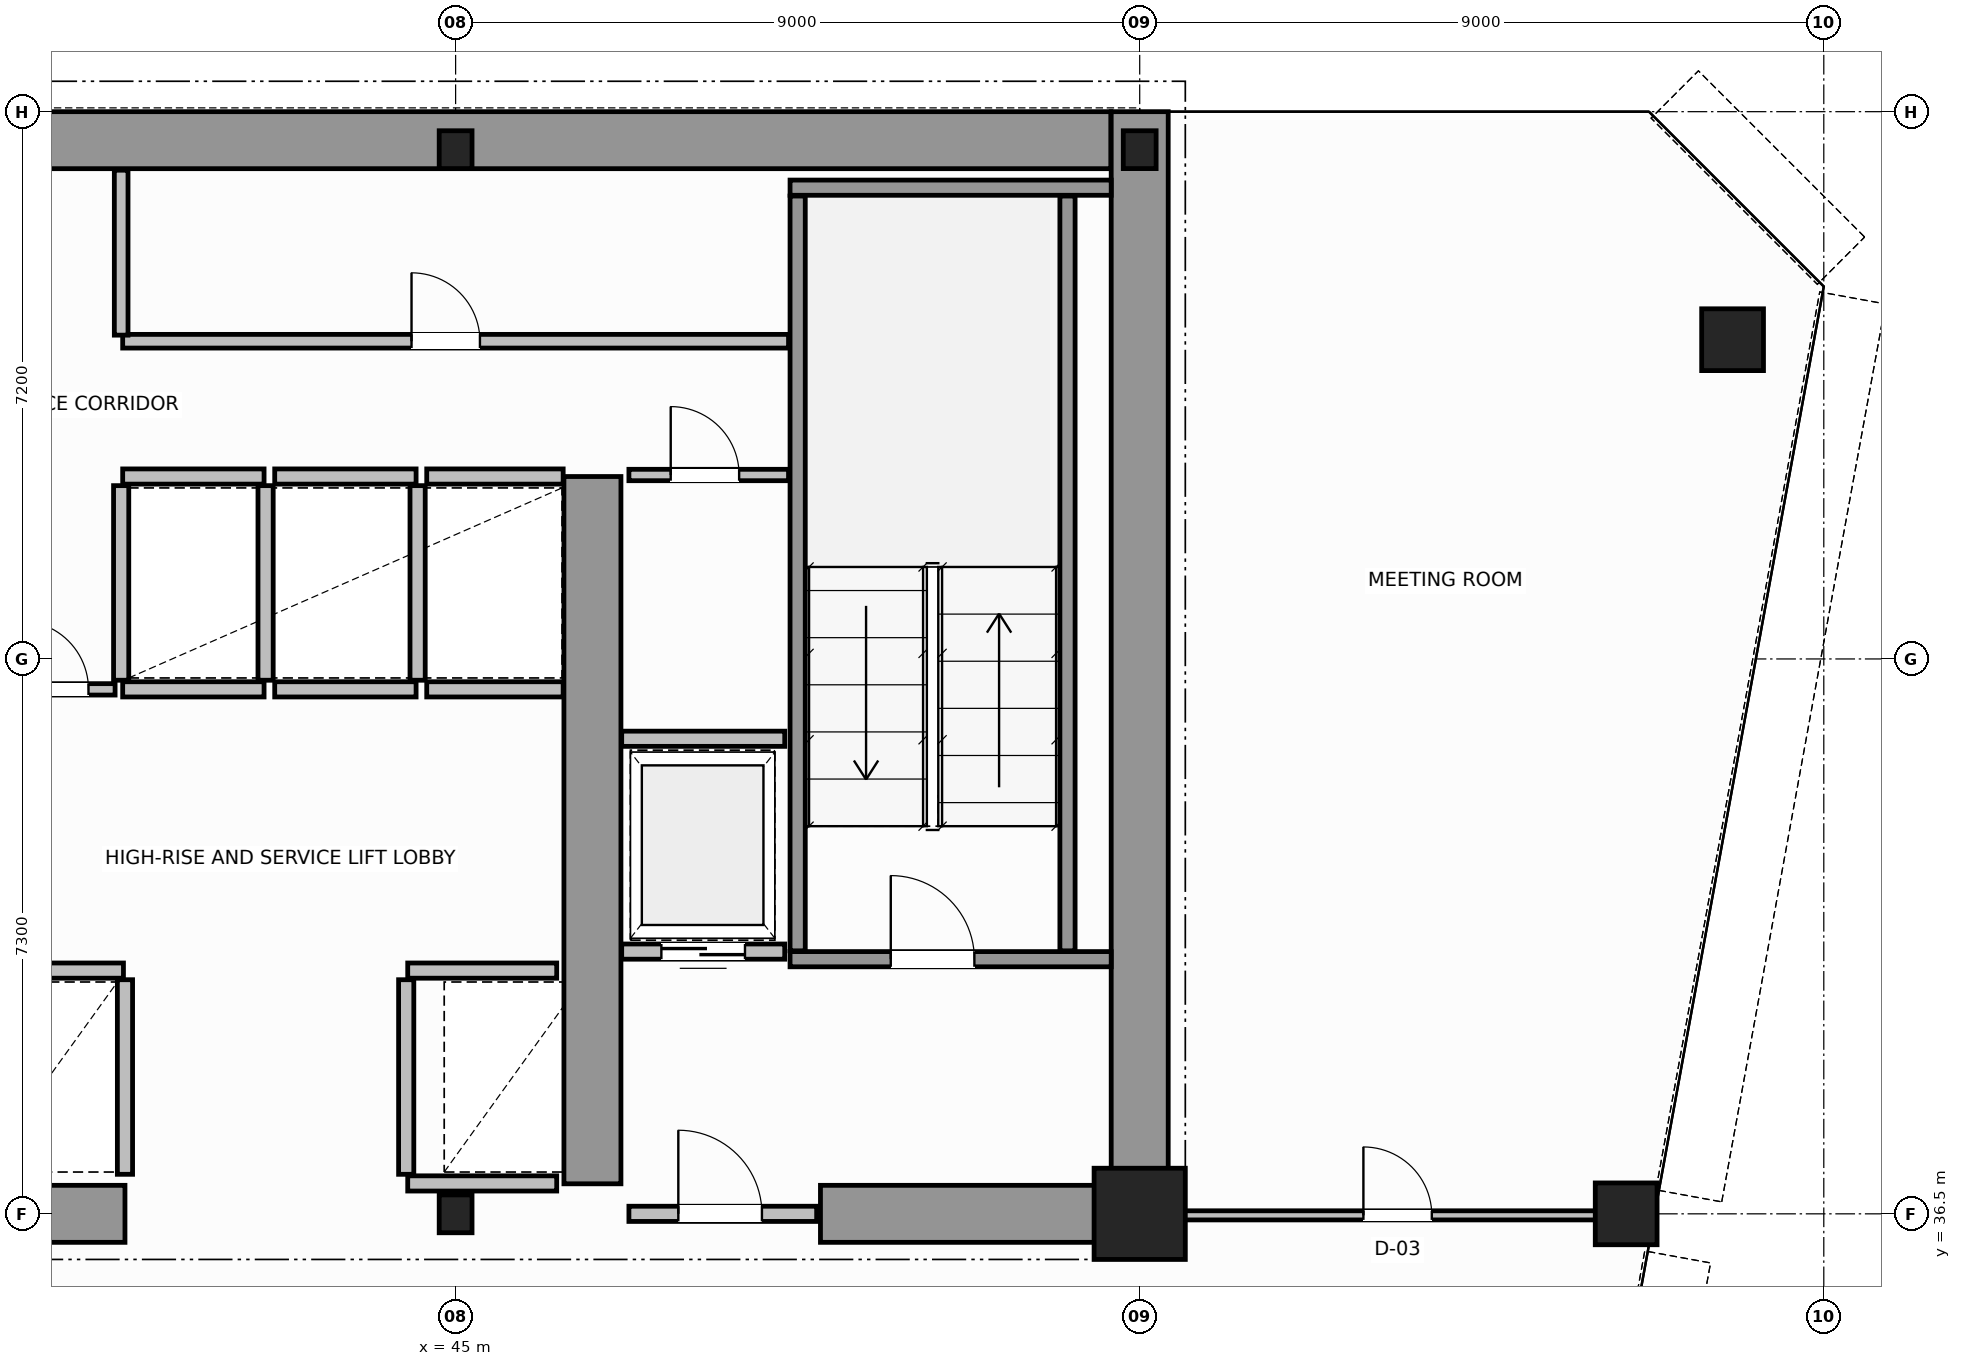
"""IFC4 building model, lengths in metres.
Left out: names, types, materials, properties, quantities, classifications, styles, units other than length and angle.
Written with IfcOpenShell. Run it as: python <this file> out.ifc"""

import sys

from ifc_helpers import new_model, si_unit, direction, frame, frame_2d, origin, origin_2d, place, context, subcontext, project, spatial, rectangle, hollow_circle, i_section, extrude, source, transform, mapped, element, fill, save


model = new_model("IFC4")
c1 = context("Model", 3, precision=1e-05, world=origin(), true_north=direction((0.0, 1.0)))
c2 = subcontext(c1, "Body", "Model", "MODEL_VIEW")
j1 = project(units=[si_unit("LENGTHUNIT", "METRE"), si_unit("PLANEANGLEUNIT", "RADIAN")], contexts=[c1])
p1 = place(None, origin())
s1 = spatial("IfcSite", under=j1, at=p1, CompositionType="ELEMENT")
p2 = place(p1, origin())
s2 = spatial("IfcBuilding", under=s1, at=p2, CompositionType="ELEMENT")
p3 = place(p2, frame((0.0, 0.0, 165.2)))
s3 = spatial("IfcBuildingStorey", under=s2, at=p3, CompositionType="ELEMENT", Elevation=165.2)
m1 = source(origin(), c2, "Body", "SweptSolid", [
    extrude(i_section(OverallWidth=0.432, OverallDepth=0.498, WebThickness=0.055, FlangeThickness=0.068, FilletRadius=0.015, at=origin_2d()), origin(), (0.0, 0.0, 1.0), 3.8),
])
p4 = place(p3, frame((45.0, 36.5, 0.0), z_axis=(0.0, 0.0, 1.0), x_axis=(1.0, 0.0, 0.0)))
e1 = element("IfcColumn", 1, at=p4, inside=s3, PredefinedType="COLUMN", context=c2, shape_type="MappedRepresentation", body=[
    mapped(m1, transform((0.0, 0.0, 0.0), scale=1.0)),
])
m2 = source(origin(), c2, "Body", "SweptSolid", [
    extrude(rectangle(XDim=1.2, YDim=1.2, at=origin_2d()), origin(), (0.0, 0.0, 1.0), 3.8),
])
p5 = place(p3, frame((54.0, 36.5, 0.0), z_axis=(0.0, 0.0, 1.0), x_axis=(1.0, 0.0, 0.0)))
e2 = element("IfcColumn", 2, at=p5, inside=s3, PredefinedType="COLUMN", context=c2, shape_type="MappedRepresentation", body=[
    mapped(m2, transform((0.0, 0.0, 0.0), scale=1.0)),
])
for number, where, z_axis, x_axis in (
    (3, (45.0, 50.5, 0.0), (0.0, 0.0, 1.0), (1.0, 0.0, 0.0)),
    (4, (54.0, 50.5, 0.0), (0.0, 0.0, 1.0), (1.0, 0.0, 0.0)),
):
    element("IfcColumn", number, at=place(p3, frame(where, z_axis=z_axis, x_axis=x_axis)), inside=s3, PredefinedType="COLUMN", context=c2, shape_type="MappedRepresentation", body=[
        mapped(m1, transform((0.0, 0.0, 0.0), scale=1.0)),
    ])
m3 = source(origin(), c2, "Body", "SweptSolid", [
    extrude(hollow_circle(Radius=0.406, WallThickness=0.04, at=origin_2d()), origin(), (0.0, 0.0, 1.0), 3.8),
])
for number, where, z_axis, x_axis in (
    (5, (61.8, 48.0, 0.0), (0.0, 0.0, 1.0), (1.0, 0.0, 0.0)),
    (6, (60.4, 36.5, 0.0), (0.0, 0.0, 1.0), (1.0, 0.0, 0.0)),
):
    element("IfcColumn", number, at=place(p3, frame(where, z_axis=z_axis, x_axis=x_axis)), inside=s3, PredefinedType="COLUMN", context=c2, shape_type="MappedRepresentation", body=[
        mapped(m3, transform((0.0, 0.0, 0.0), scale=1.0)),
    ])
p6 = place(p3, frame((34.002, 50.625, 0.0), z_axis=(0.0, 0.0, 1.0), x_axis=(1.0, 0.0, 0.0)))
e7 = element("IfcWall", 7, at=p6, inside=s3, PredefinedType="SHEAR", context=c2, shape_type="SweptSolid", body=[
    extrude(rectangle(XDim=19.619, YDim=0.75, at=frame_2d((9.81, 0.0))), origin(), (0.0, 0.0, 1.0), 3.8),
])
p7 = place(p3, frame((54.0, 36.5, 0.0), z_axis=(0.0, 0.0, 1.0), x_axis=(0.0, 1.0, 0.0)))
e8 = element("IfcWall", 8, at=p7, inside=s3, PredefinedType="SHEAR", context=c2, shape_type="SweptSolid", body=[
    extrude(rectangle(XDim=14.5, YDim=0.75, at=frame_2d((7.25, 0.0))), origin(), (0.0, 0.0, 1.0), 3.8),
])
p8 = place(p3, frame((36.15, 36.5, 0.0), z_axis=(0.0, 0.0, 1.0), x_axis=(1.0, 0.0, 0.0)))
e9 = element("IfcWall", 9, at=p8, inside=s3, PredefinedType="SHEAR", context=c2, shape_type="SweptSolid", body=[
    extrude(rectangle(XDim=4.5, YDim=0.75, at=frame_2d((2.25, 0.0))), origin(), (0.0, 0.0, 1.0), 3.8),
])
p9 = place(p3, frame((49.8, 36.5, 0.0), z_axis=(0.0, 0.0, 1.0), x_axis=(1.0, 0.0, 0.0)))
e10 = element("IfcWall", 10, at=p9, inside=s3, PredefinedType="SHEAR", context=c2, shape_type="SweptSolid", body=[
    extrude(rectangle(XDim=3.805, YDim=0.75, at=frame_2d((1.902, 0.0))), origin(), (0.0, 0.0, 1.0), 2.38),
])
p10 = place(p3, frame((46.8, 36.895, 0.0), z_axis=(0.0, 0.0, 1.0), x_axis=(0.0, 1.0, 0.0)))
e11 = element("IfcWall", 11, at=p10, inside=s3, PredefinedType="SHEAR", context=c2, shape_type="SweptSolid", body=[
    extrude(rectangle(XDim=9.305, YDim=0.75, at=frame_2d((4.652, 0.0))), origin(), (0.0, 0.0, 1.0), 3.8),
])
p11 = place(p3, frame((49.4, 39.85, 0.0), z_axis=(0.0, 0.0, 1.0), x_axis=(1.0, 0.0, 0.0)))
e12 = element("IfcWall", 12, at=p11, inside=s3, PredefinedType="SOLIDWALL", context=c2, shape_type="SweptSolid", body=[
    extrude(rectangle(XDim=4.225, YDim=0.2, at=frame_2d((2.113, 0.0))), origin(), (0.0, 0.0, 1.0), 3.8),
])
p12 = place(p11, frame((1.325, 0.0, 0.0)))
e13 = element("IfcOpeningElement", 13, at=p12, cuts=e12, PredefinedType="OPENING", context=c2, shape_type="SweptSolid", body=[
    extrude(rectangle(XDim=1.1, YDim=2.15, at=frame_2d((0.55, 1.075))), frame((0.0, 0.11, 0.0), z_axis=(0.0, -1.0, 0.0), x_axis=(1.0, 0.0, 0.0)), (0.0, 0.0, 1.0), 0.22),
])
p13 = place(p3, frame((49.4, 50.0, 0.0), z_axis=(0.0, 0.0, 1.0), x_axis=(1.0, 0.0, 0.0)))
e14 = element("IfcWall", 14, at=p13, inside=s3, PredefinedType="SOLIDWALL", context=c2, shape_type="SweptSolid", body=[
    extrude(rectangle(XDim=4.225, YDim=0.2, at=frame_2d((2.113, 0.0))), origin(), (0.0, 0.0, 1.0), 3.8),
])
for number, where, z_axis, x_axis in (
    (15, (49.5, 39.96, 0.0), (0.0, 0.0, 1.0), (0.0, 1.0, 0.0)),
    (16, (53.05, 39.96, 0.0), (0.0, 0.0, 1.0), (0.0, 1.0, 0.0)),
):
    element("IfcWall", number, at=place(p3, frame(where, z_axis=z_axis, x_axis=x_axis)), inside=s3, PredefinedType="SOLIDWALL", context=c2, shape_type="SweptSolid", body=[
        extrude(rectangle(XDim=9.93, YDim=0.2, at=frame_2d((4.965, 0.0))), origin(), (0.0, 0.0, 1.0), 3.8),
    ])
p14 = place(p3, frame((47.28, 36.5, 0.0), z_axis=(0.0, 0.0, 1.0), x_axis=(1.0, 0.0, 0.0)))
e17 = element("IfcWall", 17, at=p14, inside=s3, PredefinedType="SOLIDWALL", context=c2, shape_type="SweptSolid", body=[
    extrude(rectangle(XDim=2.47, YDim=0.2, at=frame_2d((1.235, 0.0))), origin(), (0.0, 0.0, 1.0), 2.37),
])
p15 = place(p14, frame((0.65, 0.0, 0.0)))
e18 = element("IfcOpeningElement", 18, at=p15, cuts=e17, PredefinedType="OPENING", context=c2, shape_type="SweptSolid", body=[
    extrude(rectangle(XDim=1.1, YDim=2.15, at=frame_2d((0.55, 1.075))), frame((0.0, 0.11, 0.0), z_axis=(0.0, -1.0, 0.0), x_axis=(1.0, 0.0, 0.0)), (0.0, 0.0, 1.0), 0.22),
])
p16 = place(p3, frame((38.785, 39.7, 0.0), z_axis=(0.0, 0.0, 1.0), x_axis=(1.0, 0.0, 0.0)))
e19 = element("IfcWall", 19, at=p16, inside=s3, PredefinedType="SOLIDWALL", context=c2, shape_type="SweptSolid", body=[
    extrude(rectangle(XDim=1.845, YDim=0.2, at=frame_2d((0.922, 0.0))), origin(), (0.0, 0.0, 1.0), 3.58),
])
p17 = place(p3, frame((40.65, 37.02, 0.0), z_axis=(0.0, 0.0, 1.0), x_axis=(0.0, 1.0, 0.0)))
e20 = element("IfcWall", 20, at=p17, inside=s3, PredefinedType="SOLIDWALL", context=c2, shape_type="SweptSolid", body=[
    extrude(rectangle(XDim=2.56, YDim=0.2, at=frame_2d((1.28, 0.0))), origin(), (0.0, 0.0, 1.0), 3.58),
])
p18 = place(p3, frame((44.37, 39.7, 0.0), z_axis=(0.0, 0.0, 1.0), x_axis=(1.0, 0.0, 0.0)))
e21 = element("IfcWall", 21, at=p18, inside=s3, PredefinedType="SOLIDWALL", context=c2, shape_type="SweptSolid", body=[
    extrude(rectangle(XDim=1.96, YDim=0.2, at=frame_2d((0.98, 0.0))), origin(), (0.0, 0.0, 1.0), 3.58),
])
p19 = place(p3, frame((44.37, 36.9, 0.0), z_axis=(0.0, 0.0, 1.0), x_axis=(1.0, 0.0, 0.0)))
e22 = element("IfcWall", 22, at=p19, inside=s3, PredefinedType="SOLIDWALL", context=c2, shape_type="SweptSolid", body=[
    extrude(rectangle(XDim=1.96, YDim=0.2, at=frame_2d((0.98, 0.0))), origin(), (0.0, 0.0, 1.0), 2.37),
])
p20 = place(p3, frame((44.35, 37.02, 0.0), z_axis=(0.0, 0.0, 1.0), x_axis=(0.0, 1.0, 0.0)))
e23 = element("IfcWall", 23, at=p20, inside=s3, PredefinedType="SOLIDWALL", context=c2, shape_type="SweptSolid", body=[
    extrude(rectangle(XDim=2.56, YDim=0.2, at=frame_2d((1.28, 0.0))), origin(), (0.0, 0.0, 1.0), 3.58),
])
for number, where, z_axis, x_axis in (
    (24, (40.62, 43.4, 0.0), (0.0, 0.0, 1.0), (1.0, 0.0, 0.0)),
    (25, (40.62, 46.2, 0.0), (0.0, 0.0, 1.0), (1.0, 0.0, 0.0)),
):
    element("IfcWall", number, at=place(p3, frame(where, z_axis=z_axis, x_axis=x_axis)), inside=s3, PredefinedType="SOLIDWALL", context=c2, shape_type="SweptSolid", body=[
        extrude(rectangle(XDim=1.86, YDim=0.2, at=frame_2d((0.93, 0.0))), origin(), (0.0, 0.0, 1.0), 3.58),
    ])
for number, where, z_axis, x_axis in (
    (26, (40.6, 43.52, 0.0), (0.0, 0.0, 1.0), (0.0, 1.0, 0.0)),
    (27, (42.5, 43.52, 0.0), (0.0, 0.0, 1.0), (0.0, 1.0, 0.0)),
):
    element("IfcWall", number, at=place(p3, frame(where, z_axis=z_axis, x_axis=x_axis)), inside=s3, PredefinedType="SOLIDWALL", context=c2, shape_type="SweptSolid", body=[
        extrude(rectangle(XDim=2.56, YDim=0.2, at=frame_2d((1.28, 0.0))), origin(), (0.0, 0.0, 1.0), 3.58),
    ])
for number, where, z_axis, x_axis in (
    (28, (42.62, 43.4, 0.0), (0.0, 0.0, 1.0), (1.0, 0.0, 0.0)),
    (29, (42.62, 46.2, 0.0), (0.0, 0.0, 1.0), (1.0, 0.0, 0.0)),
):
    element("IfcWall", number, at=place(p3, frame(where, z_axis=z_axis, x_axis=x_axis)), inside=s3, PredefinedType="SOLIDWALL", context=c2, shape_type="SweptSolid", body=[
        extrude(rectangle(XDim=1.86, YDim=0.2, at=frame_2d((0.93, 0.0))), origin(), (0.0, 0.0, 1.0), 3.58),
    ])
p21 = place(p3, frame((44.5, 43.52, 0.0), z_axis=(0.0, 0.0, 1.0), x_axis=(0.0, 1.0, 0.0)))
e30 = element("IfcWall", 30, at=p21, inside=s3, PredefinedType="SOLIDWALL", context=c2, shape_type="SweptSolid", body=[
    extrude(rectangle(XDim=2.56, YDim=0.2, at=frame_2d((1.28, 0.0))), origin(), (0.0, 0.0, 1.0), 3.58),
])
for number, where, z_axis, x_axis in (
    (31, (44.62, 43.4, 0.0), (0.0, 0.0, 1.0), (1.0, 0.0, 0.0)),
    (32, (44.62, 46.2, 0.0), (0.0, 0.0, 1.0), (1.0, 0.0, 0.0)),
):
    element("IfcWall", number, at=place(p3, frame(where, z_axis=z_axis, x_axis=x_axis)), inside=s3, PredefinedType="SOLIDWALL", context=c2, shape_type="SweptSolid", body=[
        extrude(rectangle(XDim=1.795, YDim=0.2, at=frame_2d((0.897, 0.0))), origin(), (0.0, 0.0, 1.0), 3.58),
    ])
p22 = place(p3, frame((47.185, 39.95, 0.0), z_axis=(0.0, 0.0, 1.0), x_axis=(1.0, 0.0, 0.0)))
e33 = element("IfcWall", 33, at=p22, inside=s3, PredefinedType="SOLIDWALL", context=c2, shape_type="SweptSolid", body=[
    extrude(rectangle(XDim=2.145, YDim=0.2, at=frame_2d((1.073, 0.0))), origin(), (0.0, 0.0, 1.0), 3.58),
])
p23 = place(p22, frame((0.522, 0.0, 0.0)))
e34 = element("IfcOpeningElement", 34, at=p23, cuts=e33, PredefinedType="OPENING", context=c2, shape_type="SweptSolid", body=[
    extrude(rectangle(XDim=1.1, YDim=2.15, at=frame_2d((0.55, 1.075))), frame((0.0, 0.11, 0.0), z_axis=(0.0, -1.0, 0.0), x_axis=(1.0, 0.0, 0.0)), (0.0, 0.0, 1.0), 0.22),
])
p24 = place(p3, frame((47.185, 42.75, 0.0), z_axis=(0.0, 0.0, 1.0), x_axis=(1.0, 0.0, 0.0)))
e35 = element("IfcWall", 35, at=p24, inside=s3, PredefinedType="SOLIDWALL", context=c2, shape_type="SweptSolid", body=[
    extrude(rectangle(XDim=2.145, YDim=0.2, at=frame_2d((1.073, 0.0))), origin(), (0.0, 0.0, 1.0), 3.58),
])
p25 = place(p3, frame((47.28, 46.22, 0.0), z_axis=(0.0, 0.0, 1.0), x_axis=(1.0, 0.0, 0.0)))
e36 = element("IfcWall", 36, at=p25, inside=s3, PredefinedType="PARTITIONING", context=c2, shape_type="SweptSolid", body=[
    extrude(rectangle(XDim=2.1, YDim=0.15, at=frame_2d((1.05, 0.0))), origin(), (0.0, 0.0, 1.0), 3.58),
])
p26 = place(p25, frame((0.55, 0.0, 0.0)))
e37 = element("IfcOpeningElement", 37, at=p26, cuts=e36, PredefinedType="OPENING", context=c2, shape_type="SweptSolid", body=[
    extrude(rectangle(XDim=0.9, YDim=2.1, at=frame_2d((0.45, 1.05))), frame((0.0, 0.085, 0.0), z_axis=(0.0, -1.0, 0.0), x_axis=(1.0, 0.0, 0.0)), (0.0, 0.0, 1.0), 0.17),
])
p27 = place(p3, frame((38.92, 43.4, 0.0), z_axis=(0.0, 0.0, 1.0), x_axis=(1.0, 0.0, 0.0)))
e38 = element("IfcWall", 38, at=p27, inside=s3, PredefinedType="PARTITIONING", context=c2, shape_type="SweptSolid", body=[
    extrude(rectangle(XDim=1.6, YDim=0.15, at=frame_2d((0.8, 0.0))), origin(), (0.0, 0.0, 1.0), 3.58),
])
p28 = place(p27, frame((0.35, 0.0, 0.0)))
e39 = element("IfcOpeningElement", 39, at=p28, cuts=e38, PredefinedType="OPENING", context=c2, shape_type="SweptSolid", body=[
    extrude(rectangle(XDim=0.9, YDim=2.1, at=frame_2d((0.45, 1.05))), frame((0.0, 0.085, 0.0), z_axis=(0.0, -1.0, 0.0), x_axis=(1.0, 0.0, 0.0)), (0.0, 0.0, 1.0), 0.17),
])
p29 = place(p3, frame((40.62, 47.98, 0.0), z_axis=(0.0, 0.0, 1.0), x_axis=(1.0, 0.0, 0.0)))
e40 = element("IfcWall", 40, at=p29, inside=s3, PredefinedType="PLUMBINGWALL", context=c2, shape_type="SweptSolid", body=[
    extrude(rectangle(XDim=8.76, YDim=0.18, at=frame_2d((4.38, 0.0))), origin(), (0.0, 0.0, 1.0), 3.58),
])
p30 = place(p29, frame((3.8, 0.0, 0.0)))
e41 = element("IfcOpeningElement", 41, at=p30, cuts=e40, PredefinedType="OPENING", context=c2, shape_type="SweptSolid", body=[
    extrude(rectangle(XDim=0.9, YDim=2.15, at=frame_2d((0.45, 1.075))), frame((0.0, 0.1, 0.0), z_axis=(0.0, -1.0, 0.0), x_axis=(1.0, 0.0, 0.0)), (0.0, 0.0, 1.0), 0.2),
])
p31 = place(p3, frame((40.6, 48.06, 0.0), z_axis=(0.0, 0.0, 1.0), x_axis=(0.0, 1.0, 0.0)))
e42 = element("IfcWall", 42, at=p31, inside=s3, PredefinedType="PLUMBINGWALL", context=c2, shape_type="SweptSolid", body=[
    extrude(rectangle(XDim=2.17, YDim=0.18, at=frame_2d((1.085, 0.0))), origin(), (0.0, 0.0, 1.0), 3.58),
])
p32 = place(p3, frame((54.06, 36.48, 0.0), z_axis=(0.0, 0.0, 1.0), x_axis=(1.0, 0.0, 0.0)))
e43 = element("IfcWall", 43, at=p32, inside=s3, PredefinedType="PARTITIONING", context=c2, shape_type="SweptSolid", body=[
    extrude(rectangle(XDim=6.666, YDim=0.12, at=frame_2d((3.333, 0.0))), origin(), (0.0, 0.0, 1.0), 2.97),
])
p33 = place(p32, frame((2.883, 0.0, 0.0)))
e44 = element("IfcOpeningElement", 44, at=p33, cuts=e43, PredefinedType="OPENING", context=c2, shape_type="SweptSolid", body=[
    extrude(rectangle(XDim=0.9, YDim=2.15, at=frame_2d((0.45, 1.075))), frame((0.0, 0.07, 0.0), z_axis=(0.0, -1.0, 0.0), x_axis=(1.0, 0.0, 0.0)), (0.0, 0.0, 1.0), 0.14),
])
m4 = source(origin(), c2, "Body", "SweptSolid", [
    extrude(rectangle(XDim=1.1, YDim=2.15, at=frame_2d((0.55, 1.075))), frame((0.0, 0.025, 0.0), z_axis=(0.0, -1.0, 0.0), x_axis=(1.0, 0.0, 0.0)), (0.0, 0.0, 1.0), 0.05),
])
p34 = place(p12, origin())
e45 = element("IfcDoor", 45, at=p34, inside=s3, OperationType="SINGLE_SWING_RIGHT", PredefinedType="DOOR", context=c2, shape_type="MappedRepresentation", body=[
    mapped(m4, transform((0.0, 0.0, 0.0), scale=1.0)),
])
fill(e13, e45)
p35 = place(p15, origin())
e46 = element("IfcDoor", 46, at=p35, inside=s3, OperationType="SINGLE_SWING_LEFT", PredefinedType="DOOR", context=c2, shape_type="MappedRepresentation", body=[
    mapped(m4, transform((0.0, 0.0, 0.0), scale=1.0)),
])
fill(e18, e46)
p36 = place(p23, origin())
e47 = element("IfcDoor", 47, at=p36, inside=s3, OperationType="DOUBLE_DOOR_SLIDING", PredefinedType="DOOR", context=c2, shape_type="MappedRepresentation", body=[
    mapped(m4, transform((0.0, 0.0, 0.0), scale=1.0)),
])
fill(e34, e47)
m5 = source(origin(), c2, "Body", "SweptSolid", [
    extrude(rectangle(XDim=0.9, YDim=2.1, at=frame_2d((0.45, 1.05))), frame((0.0, 0.025, 0.0), z_axis=(0.0, -1.0, 0.0), x_axis=(1.0, 0.0, 0.0)), (0.0, 0.0, 1.0), 0.05),
])
p37 = place(p26, origin())
e48 = element("IfcDoor", 48, at=p37, inside=s3, OperationType="SINGLE_SWING_RIGHT", PredefinedType="DOOR", context=c2, shape_type="MappedRepresentation", body=[
    mapped(m5, transform((0.0, 0.0, 0.0), scale=1.0)),
])
fill(e37, e48)
p38 = place(p28, origin())
e49 = element("IfcDoor", 49, at=p38, inside=s3, OperationType="SINGLE_SWING_LEFT", PredefinedType="DOOR", context=c2, shape_type="MappedRepresentation", body=[
    mapped(m5, transform((0.0, 0.0, 0.0), scale=1.0)),
])
fill(e39, e49)
m6 = source(origin(), c2, "Body", "SweptSolid", [
    extrude(rectangle(XDim=0.9, YDim=2.15, at=frame_2d((0.45, 1.075))), frame((0.0, 0.025, 0.0), z_axis=(0.0, -1.0, 0.0), x_axis=(1.0, 0.0, 0.0)), (0.0, 0.0, 1.0), 0.05),
])
p39 = place(p30, origin())
e50 = element("IfcDoor", 50, at=p39, inside=s3, OperationType="SINGLE_SWING_RIGHT", PredefinedType="DOOR", context=c2, shape_type="MappedRepresentation", body=[
    mapped(m6, transform((0.0, 0.0, 0.0), scale=1.0)),
])
fill(e41, e50)
p40 = place(p33, origin())
e51 = element("IfcDoor", 51, at=p40, inside=s3, OperationType="SINGLE_SWING_RIGHT", PredefinedType="DOOR", context=c2, shape_type="MappedRepresentation", body=[
    mapped(m6, transform((0.0, 0.0, 0.0), scale=1.0)),
])
fill(e44, e51)
save(model, sys.argv[1])
